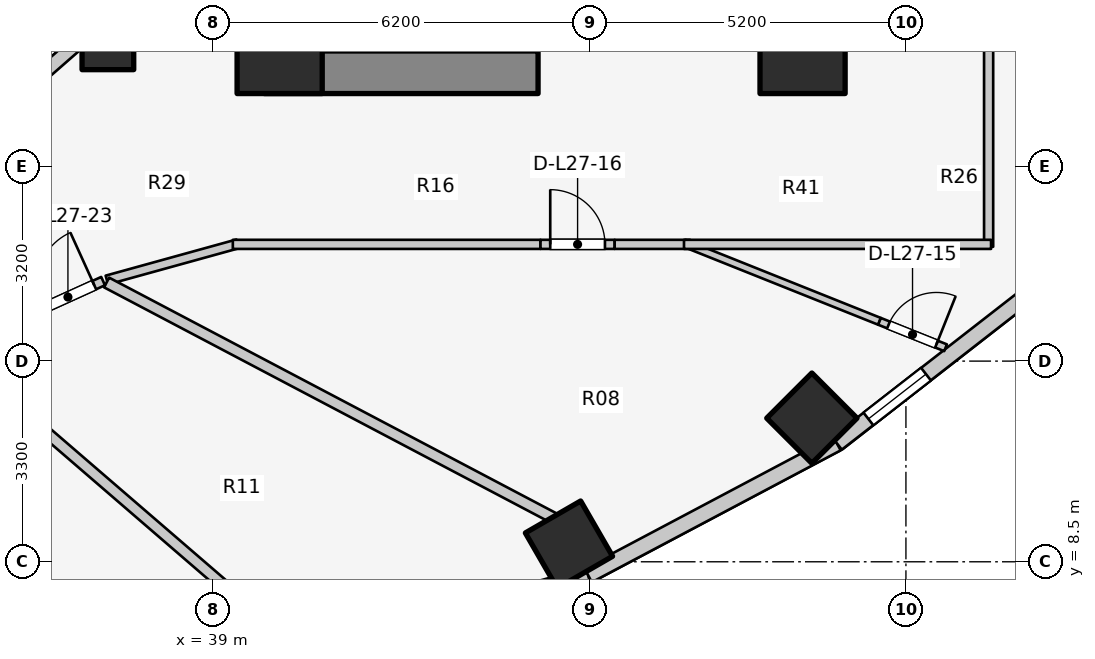
"""IFC4 building model, lengths in metres.
Left out: names, types, materials, properties, quantities, classifications, styles, units other than length and angle.
Written with IfcOpenShell. Run it as: python <this file> out.ifc"""

import sys

from ifc_helpers import new_model, si_unit, direction, frame, frame_2d, origin, origin_2d, place, context, subcontext, project, spatial, rectangle, extrude, element, fill, save


model = new_model("IFC4")
c1 = context("Model", 3, precision=1e-05, world=origin(), true_north=direction((0.0, 1.0)))
c2 = subcontext(c1, "Body", "Model", "MODEL_VIEW")
j1 = project(units=[si_unit("LENGTHUNIT", "METRE"), si_unit("PLANEANGLEUNIT", "RADIAN")], contexts=[c1])
p1 = place(None, origin())
s1 = spatial("IfcSite", under=j1, at=p1, CompositionType="ELEMENT")
p2 = place(p1, origin())
s2 = spatial("IfcBuilding", under=s1, at=p2, CompositionType="ELEMENT")
p3 = place(p2, frame((0.0, 0.0, 91.8)))
s3 = spatial("IfcBuildingStorey", under=s2, at=p3, CompositionType="ELEMENT", Elevation=91.8)
p4 = place(p3, frame((39.85, 16.55, 0.0), z_axis=(0.0, 0.0, 1.0), x_axis=(1.0, 0.0, 0.0)))
e1 = element("IfcWall", 1, at=p4, inside=s3, PredefinedType="SHEAR", context=c2, shape_type="SweptSolid", body=[
    extrude(rectangle(XDim=4.5, YDim=0.7, at=frame_2d((2.25, 0.0))), origin(), (0.0, 0.0, 1.0), 3.1),
])
for number, where, z_axis, x_axis in (
    (2, (40.1, 16.9, 0.0), (0.0, 0.0, 1.0), (1.0, 0.0, 0.0)),
    (3, (48.7, 16.9, 0.0), (0.0, 0.0, 1.0), (1.0, 0.0, 0.0)),
):
    element("IfcColumn", number, at=place(p3, frame(where, z_axis=z_axis, x_axis=x_axis)), inside=s3, PredefinedType="COLUMN", context=c2, shape_type="SweptSolid", body=[
        extrude(rectangle(XDim=1.4, YDim=1.4, at=origin_2d()), origin(), (0.0, 0.0, 1.0), 3.1),
    ])
p5 = place(p3, frame((44.858, 8.782, 0.0), z_axis=(0.0, 0.0, 1.0), x_axis=(0.5, -0.866025403784, 0.0)))
e4 = element("IfcColumn", 4, at=p5, inside=s3, PredefinedType="COLUMN", context=c2, shape_type="SweptSolid", body=[
    extrude(rectangle(XDim=1.05, YDim=1.05, at=origin_2d()), origin(), (0.0, 0.0, 1.0), 3.1),
])
p6 = place(p3, frame((37.275, 17.018, 0.0), z_axis=(0.0, 0.0, 1.0), x_axis=(1.0, 0.0, 0.0)))
e5 = element("IfcColumn", 5, at=p6, inside=s3, PredefinedType="COLUMN", context=c2, shape_type="SweptSolid", body=[
    extrude(rectangle(XDim=0.85, YDim=0.85, at=origin_2d()), origin(), (0.0, 0.0, 1.0), 3.1),
])
p7 = place(p3, frame((48.853, 10.862, 0.0), z_axis=(0.0, 0.0, 1.0), x_axis=(0.707106781187, -0.707106781187, 0.0)))
e6 = element("IfcColumn", 6, at=p7, inside=s3, PredefinedType="COLUMN", context=c2, shape_type="SweptSolid", body=[
    extrude(rectangle(XDim=1.05, YDim=1.05, at=origin_2d()), origin(), (0.0, 0.0, 1.0), 3.1),
])
p8 = place(p3, frame((35.56, 15.968, 0.0), z_axis=(0.0, 0.0, 1.0), x_axis=(0.752576694707, 0.658504607869, 0.0)))
e7 = element("IfcWall", 7, at=p8, inside=s3, PredefinedType="STANDARD", context=c2, shape_type="SweptSolid", body=[
    extrude(rectangle(XDim=1.959, YDim=0.23, at=frame_2d((0.98, 0.0))), origin(), (0.0, 0.0, 1.0), 1.22),
])
p9 = place(p3, frame((39.816, 6.778, 0.0), z_axis=(0.0, 0.0, 1.0), x_axis=(0.962938491413, 0.269721081407, 0.0)))
e8 = element("IfcWall", 8, at=p9, inside=s3, PredefinedType="STANDARD", context=c2, shape_type="SweptSolid", body=[
    extrude(rectangle(XDim=5.563, YDim=0.26, at=frame_2d((2.782, 0.0))), origin(), (0.0, 0.0, 1.0), 1.22),
])
p10 = place(p9, frame((2.182, 0.0, 0.15)))
e9 = element("IfcOpeningElement", 9, at=p10, cuts=e8, PredefinedType="OPENING", context=c2, shape_type="SweptSolid", body=[
    extrude(rectangle(XDim=1.2, YDim=0.9, at=frame_2d((0.6, 0.45))), frame((0.0, 0.14, 0.0), z_axis=(0.0, -1.0, 0.0), x_axis=(1.0, 0.0, 0.0)), (0.0, 0.0, 1.0), 0.28),
])
p11 = place(p3, frame((45.173, 8.279, 0.0), z_axis=(0.0, 0.0, 1.0), x_axis=(0.883668636807, 0.4681129568, 0.0)))
e10 = element("IfcWall", 10, at=p11, inside=s3, PredefinedType="STANDARD", context=c2, shape_type="SweptSolid", body=[
    extrude(rectangle(XDim=4.631, YDim=0.26, at=frame_2d((2.316, 0.0))), origin(), (0.0, 0.0, 1.0), 1.22),
])
p12 = place(p3, frame((49.266, 10.447, 0.0), z_axis=(0.0, 0.0, 1.0), x_axis=(0.789127449954, 0.614229491094, 0.0)))
e11 = element("IfcWall", 11, at=p12, inside=s3, PredefinedType="STANDARD", context=c2, shape_type="SweptSolid", body=[
    extrude(rectangle(XDim=4.505, YDim=0.26, at=frame_2d((2.252, 0.0))), origin(), (0.0, 0.0, 1.0), 1.22),
])
p13 = place(p12, frame((0.655, 0.0, 0.15)))
e12 = element("IfcOpeningElement", 12, at=p13, cuts=e11, PredefinedType="OPENING", context=c2, shape_type="SweptSolid", body=[
    extrude(rectangle(XDim=1.2, YDim=0.9, at=frame_2d((0.6, 0.45))), frame((0.0, 0.14, 0.0), z_axis=(0.0, -1.0, 0.0), x_axis=(1.0, 0.0, 0.0)), (0.0, 0.0, 1.0), 0.28),
])
p14 = place(p3, frame((51.76, 13.68, 0.0), z_axis=(0.0, 0.0, 1.0), x_axis=(0.0, 1.0, 0.0)))
e13 = element("IfcWall", 13, at=p14, inside=s3, PredefinedType="PARTITIONING", context=c2, shape_type="SweptSolid", body=[
    extrude(rectangle(XDim=3.535, YDim=0.15, at=frame_2d((1.768, 0.0))), origin(), (0.0, 0.0, 1.0), 2.575),
])
p15 = place(p3, frame((46.754, 13.739, 0.0), z_axis=(0.0, 0.0, 1.0), x_axis=(0.928501027376, -0.371329829345, 0.0)))
e14 = element("IfcWall", 14, at=p15, inside=s3, PredefinedType="MOVABLE", context=c2, shape_type="SweptSolid", body=[
    extrude(rectangle(XDim=3.459, YDim=0.12, at=frame_2d((1.729, 0.0))), origin(), (0.0, 0.0, 1.0), 1.22),
])
p16 = place(p3, frame((49.965, 12.454, 0.0), z_axis=(0.0, 0.0, 1.0), x_axis=(0.928548626085, -0.371210787822, 0.0)))
e15 = element("IfcWall", 15, at=p16, inside=s3, PredefinedType="MOVABLE", context=c2, shape_type="SweptSolid", body=[
    extrude(rectangle(XDim=1.17, YDim=0.12, at=frame_2d((0.585, 0.0))), origin(), (0.0, 0.0, 1.0), 2.575),
])
p17 = place(p16, frame((0.16, 0.0, 0.0)))
e16 = element("IfcOpeningElement", 16, at=p17, cuts=e15, PredefinedType="OPENING", context=c2, shape_type="SweptSolid", body=[
    extrude(rectangle(XDim=0.85, YDim=2.05, at=frame_2d((0.425, 1.025))), frame((0.0, 0.07, 0.0), z_axis=(0.0, -1.0, 0.0), x_axis=(1.0, 0.0, 0.0)), (0.0, 0.0, 1.0), 0.14),
])
p18 = place(p3, frame((37.258, 13.133, 0.0), z_axis=(0.0, 0.0, 1.0), x_axis=(0.963833843713, 0.266503886865, 0.0)))
e17 = element("IfcWall", 17, at=p18, inside=s3, PredefinedType="PARTITIONING", context=c2, shape_type="SweptSolid", body=[
    extrude(rectangle(XDim=2.232, YDim=0.15, at=frame_2d((1.116, 0.0))), origin(), (0.0, 0.0, 1.0), 1.22),
])
p19 = place(p3, frame((39.33, 13.72, 0.0), z_axis=(0.0, 0.0, 1.0), x_axis=(1.0, 0.0, 0.0)))
e18 = element("IfcWall", 18, at=p19, inside=s3, PredefinedType="PARTITIONING", context=c2, shape_type="SweptSolid", body=[
    extrude(rectangle(XDim=5.06, YDim=0.15, at=frame_2d((2.53, 0.0))), origin(), (0.0, 0.0, 1.0), 1.22),
])
p20 = place(p3, frame((44.39, 13.72, 0.0), z_axis=(0.0, 0.0, 1.0), x_axis=(1.0, 0.0, 0.0)))
e19 = element("IfcWall", 19, at=p20, inside=s3, PredefinedType="PARTITIONING", context=c2, shape_type="SweptSolid", body=[
    extrude(rectangle(XDim=1.22, YDim=0.15, at=frame_2d((0.61, 0.0))), origin(), (0.0, 0.0, 1.0), 2.16),
])
p21 = place(p20, frame((0.16, 0.0, 0.0)))
e20 = element("IfcOpeningElement", 20, at=p21, cuts=e19, PredefinedType="OPENING", context=c2, shape_type="SweptSolid", body=[
    extrude(rectangle(XDim=0.9, YDim=2.1, at=frame_2d((0.45, 1.05))), frame((0.0, 0.085, 0.0), z_axis=(0.0, -1.0, 0.0), x_axis=(1.0, 0.0, 0.0)), (0.0, 0.0, 1.0), 0.17),
])
p22 = place(p3, frame((45.61, 13.72, 0.0), z_axis=(0.0, 0.0, 1.0), x_axis=(1.0, 0.0, 0.0)))
e21 = element("IfcWall", 21, at=p22, inside=s3, PredefinedType="PARTITIONING", context=c2, shape_type="SweptSolid", body=[
    extrude(rectangle(XDim=1.24, YDim=0.15, at=frame_2d((0.62, 0.0))), origin(), (0.0, 0.0, 1.0), 2.575),
])
p23 = place(p3, frame((46.75, 13.72, 0.0), z_axis=(0.0, 0.0, 1.0), x_axis=(1.0, 0.0, 0.0)))
e22 = element("IfcWall", 22, at=p23, inside=s3, PredefinedType="PARTITIONING", context=c2, shape_type="SweptSolid", body=[
    extrude(rectangle(XDim=5.05, YDim=0.15, at=frame_2d((2.525, 0.0))), origin(), (0.0, 0.0, 1.0), 1.22),
])
p24 = place(p3, frame((34.736, 11.943, 0.0), z_axis=(0.0, 0.0, 1.0), x_axis=(0.757299396002, -0.65306785621, 0.0)))
e23 = element("IfcWall", 23, at=p24, inside=s3, PredefinedType="PARTITIONING", context=c2, shape_type="SweptSolid", body=[
    extrude(rectangle(XDim=6.289, YDim=0.18, at=frame_2d((3.145, 0.0))), origin(), (0.0, 0.0, 1.0), 1.22),
])
p25 = place(p3, frame((37.254, 13.093, 0.0), z_axis=(0.0, 0.0, 1.0), x_axis=(0.884730147854, -0.466103599512, 0.0)))
e24 = element("IfcWall", 24, at=p25, inside=s3, PredefinedType="PARTITIONING", context=c2, shape_type="SweptSolid", body=[
    extrude(rectangle(XDim=8.31, YDim=0.18, at=frame_2d((4.155, 0.0))), origin(), (0.0, 0.0, 1.0), 1.22),
])
p26 = place(p3, frame((36.04, 12.591, 0.0), z_axis=(0.0, 0.0, 1.0), x_axis=(0.910596749825, 0.413295970472, 0.0)))
e25 = element("IfcWall", 25, at=p26, inside=s3, PredefinedType="PARTITIONING", context=c2, shape_type="SweptSolid", body=[
    extrude(rectangle(XDim=1.27, YDim=0.15, at=frame_2d((0.635, 0.0))), origin(), (0.0, 0.0, 1.0), 2.16),
])
p27 = place(p26, frame((0.16, 0.0, 0.0)))
e26 = element("IfcOpeningElement", 26, at=p27, cuts=e25, PredefinedType="OPENING", context=c2, shape_type="SweptSolid", body=[
    extrude(rectangle(XDim=0.95, YDim=2.1, at=frame_2d((0.475, 1.05))), frame((0.0, 0.085, 0.0), z_axis=(0.0, -1.0, 0.0), x_axis=(1.0, 0.0, 0.0)), (0.0, 0.0, 1.0), 0.17),
])
p28 = place(p13, origin())
e27 = element("IfcWindow", 27, at=p28, inside=s3, PartitioningType="SINGLE_PANEL", PredefinedType="WINDOW", context=c2, shape_type="SweptSolid", body=[
    extrude(rectangle(XDim=1.2, YDim=0.9, at=frame_2d((0.6, 0.45))), frame((0.0, 0.03, 0.0), z_axis=(0.0, -1.0, 0.0), x_axis=(1.0, 0.0, 0.0)), (0.0, 0.0, 1.0), 0.06),
])
fill(e12, e27)
p29 = place(p17, origin())
e28 = element("IfcDoor", 28, at=p29, inside=s3, OperationType="SINGLE_SWING_RIGHT", PredefinedType="DOOR", context=c2, shape_type="SweptSolid", body=[
    extrude(rectangle(XDim=0.85, YDim=2.05, at=frame_2d((0.425, 1.025))), frame((0.0, 0.025, 0.0), z_axis=(0.0, -1.0, 0.0), x_axis=(1.0, 0.0, 0.0)), (0.0, 0.0, 1.0), 0.05),
])
fill(e16, e28)
p30 = place(p21, origin())
e29 = element("IfcDoor", 29, at=p30, inside=s3, OperationType="SINGLE_SWING_LEFT", PredefinedType="DOOR", context=c2, shape_type="SweptSolid", body=[
    extrude(rectangle(XDim=0.9, YDim=2.1, at=frame_2d((0.45, 1.05))), frame((0.0, 0.025, 0.0), z_axis=(0.0, -1.0, 0.0), x_axis=(1.0, 0.0, 0.0)), (0.0, 0.0, 1.0), 0.05),
])
fill(e20, e29)
p31 = place(p27, origin())
e30 = element("IfcDoor", 30, at=p31, inside=s3, OperationType="SINGLE_SWING_RIGHT", PredefinedType="DOOR", context=c2, shape_type="SweptSolid", body=[
    extrude(rectangle(XDim=0.95, YDim=2.1, at=frame_2d((0.475, 1.05))), frame((0.0, 0.025, 0.0), z_axis=(0.0, -1.0, 0.0), x_axis=(1.0, 0.0, 0.0)), (0.0, 0.0, 1.0), 0.05),
])
fill(e26, e30)
save(model, sys.argv[1])
